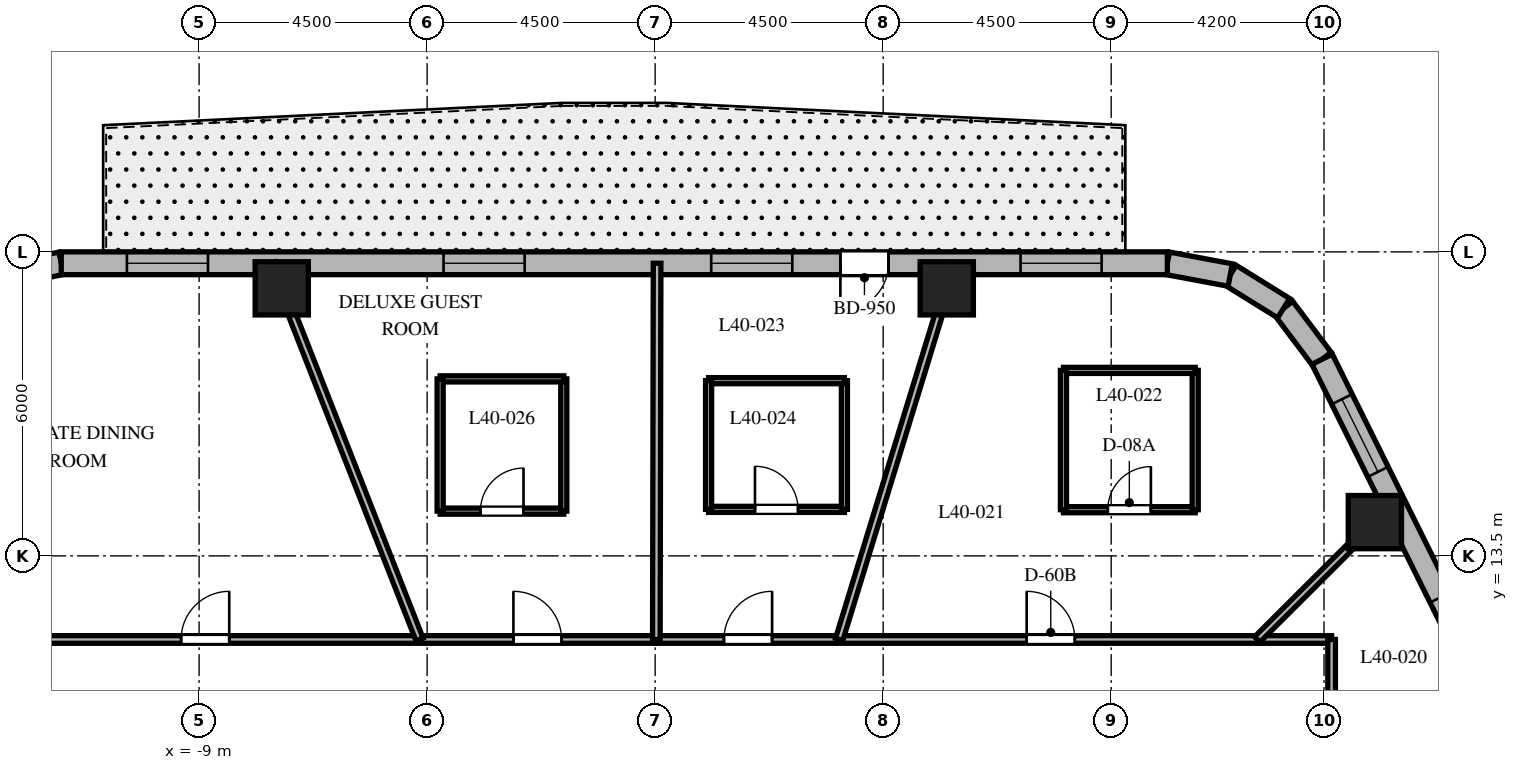
"""IFC4 building model, lengths in metres.
Left out: names, types, materials, properties, quantities, classifications, styles, units other than length and angle.
Written with IfcOpenShell. Run it as: python <this file> out.ifc"""

import sys

from ifc_helpers import new_model, si_unit, direction, frame, frame_2d, origin, origin_2d, place, context, subcontext, project, spatial, rectangle, extrude, element, fill, save


model = new_model("IFC4")
c1 = context("Model", 3, precision=1e-05, world=origin(), true_north=direction((0.0, 1.0)))
c2 = subcontext(c1, "Body", "Model", "MODEL_VIEW")
j1 = project(units=[si_unit("LENGTHUNIT", "METRE"), si_unit("PLANEANGLEUNIT", "RADIAN")], contexts=[c1])
p1 = place(None, origin())
s1 = spatial("IfcSite", under=j1, at=p1, CompositionType="ELEMENT")
p2 = place(p1, origin())
s2 = spatial("IfcBuilding", under=s1, at=p2, CompositionType="ELEMENT")
p3 = place(p2, frame((0.0, 0.0, 162.8)))
s3 = spatial("IfcBuildingStorey", under=s2, at=p3, CompositionType="ELEMENT", Elevation=162.8)
for number, where, z_axis, x_axis in (
    (1, (14.204, 14.166, 0.0), (0.0, 0.0, 1.0), (1.0, 0.0, 0.0)),
    (2, (5.755, 18.78, 0.0), (0.0, 0.0, 1.0), (1.0, 0.0, 0.0)),
    (3, (-7.369, 18.78, 0.0), (0.0, 0.0, 1.0), (1.0, 0.0, 0.0)),
):
    element("IfcColumn", number, at=place(p3, frame(where, z_axis=z_axis, x_axis=x_axis)), inside=s3, PredefinedType="COLUMN", context=c2, shape_type="SweptSolid", body=[
        extrude(rectangle(XDim=1.05, YDim=1.05, at=origin_2d()), origin(), (0.0, 0.0, 1.0), 3.7),
    ])
p4 = place(p3, frame((13.162, 17.381, 0.0), z_axis=(0.0, 0.0, 1.0), x_axis=(-0.601515770517, 0.798860925205, 0.0)))
e4 = element("IfcWall", 4, at=p4, inside=s3, PredefinedType="SOLIDWALL", context=c2, shape_type="SweptSolid", body=[
    extrude(rectangle(XDim=1.262, YDim=0.45, at=frame_2d((0.631, 0.0))), origin(), (0.0, 0.0, 1.0), 3.4),
])
p5 = place(p3, frame((12.403, 18.389, 0.0), z_axis=(0.0, 0.0, 1.0), x_axis=(-0.849795170926, 0.527113049991, 0.0)))
e5 = element("IfcWall", 5, at=p5, inside=s3, PredefinedType="SOLIDWALL", context=c2, shape_type="SweptSolid", body=[
    extrude(rectangle(XDim=1.241, YDim=0.45, at=frame_2d((0.62, 0.0))), origin(), (0.0, 0.0, 1.0), 3.4),
])
p6 = place(p3, frame((11.349, 19.043, 0.0), z_axis=(0.0, 0.0, 1.0), x_axis=(-0.982931267051, 0.183973161772, 0.0)))
e6 = element("IfcWall", 6, at=p6, inside=s3, PredefinedType="SOLIDWALL", context=c2, shape_type="SweptSolid", body=[
    extrude(rectangle(XDim=1.262, YDim=0.45, at=frame_2d((0.631, 0.0))), origin(), (0.0, 0.0, 1.0), 3.4),
])
p7 = place(p3, frame((-11.72, 19.275, 0.0), z_axis=(0.0, 0.0, 1.0), x_axis=(-0.97893106758, -0.204191001093, 0.0)))
e7 = element("IfcWall", 7, at=p7, inside=s3, PredefinedType="SOLIDWALL", context=c2, shape_type="SweptSolid", body=[
    extrude(rectangle(XDim=1.4, YDim=0.45, at=frame_2d((0.7, 0.0))), origin(), (0.0, 0.0, 1.0), 3.4),
])
p8 = place(p3, frame((20.618, 2.344, 0.0), z_axis=(0.0, 0.0, 1.0), x_axis=(-0.444243691097, 0.895905990002, 0.0)))
e8 = element("IfcWall", 8, at=p8, inside=s3, PredefinedType="SOLIDWALL", context=c2, shape_type="SweptSolid", body=[
    extrude(rectangle(XDim=16.784, YDim=0.45, at=frame_2d((8.392, 0.0))), origin(), (0.0, 0.0, 1.0), 3.4),
])
p9 = place(p8, frame((5.245, 0.0, 0.8)))
e9 = element("IfcOpeningElement", 9, at=p9, cuts=e8, PredefinedType="OPENING", context=c2, shape_type="SweptSolid", body=[
    extrude(rectangle(XDim=1.6, YDim=1.75, at=frame_2d((0.8, 0.875))), frame((0.0, 0.235, 0.0), z_axis=(0.0, -1.0, 0.0), x_axis=(1.0, 0.0, 0.0)), (0.0, 0.0, 1.0), 0.47),
])
p10 = place(p8, frame((9.936, 0.0, 0.8)))
e10 = element("IfcOpeningElement", 10, at=p10, cuts=e8, PredefinedType="OPENING", context=c2, shape_type="SweptSolid", body=[
    extrude(rectangle(XDim=1.6, YDim=1.75, at=frame_2d((0.8, 0.875))), frame((0.0, 0.235, 0.0), z_axis=(0.0, -1.0, 0.0), x_axis=(1.0, 0.0, 0.0)), (0.0, 0.0, 1.0), 0.47),
])
p11 = place(p8, frame((14.303, 0.0, 0.8)))
e11 = element("IfcOpeningElement", 11, at=p11, cuts=e8, PredefinedType="OPENING", context=c2, shape_type="SweptSolid", body=[
    extrude(rectangle(XDim=1.6, YDim=1.75, at=frame_2d((0.8, 0.875))), frame((0.0, 0.235, 0.0), z_axis=(0.0, -1.0, 0.0), x_axis=(1.0, 0.0, 0.0)), (0.0, 0.0, 1.0), 0.47),
])
p12 = place(p8, frame((0.931, 0.0, 0.8)))
e12 = element("IfcOpeningElement", 12, at=p12, cuts=e8, PredefinedType="OPENING", context=c2, shape_type="SweptSolid", body=[
    extrude(rectangle(XDim=1.6, YDim=1.75, at=frame_2d((0.8, 0.875))), frame((0.0, 0.235, 0.0), z_axis=(0.0, -1.0, 0.0), x_axis=(1.0, 0.0, 0.0)), (0.0, 0.0, 1.0), 0.47),
])
p13 = place(p3, frame((10.108, 19.275, 0.0), z_axis=(0.0, 0.0, 1.0), x_axis=(-1.0, 0.0, 0.0)))
e13 = element("IfcWall", 13, at=p13, inside=s3, PredefinedType="SOLIDWALL", context=c2, shape_type="SweptSolid", body=[
    extrude(rectangle(XDim=21.829, YDim=0.45, at=frame_2d((10.915, 0.0))), origin(), (0.0, 0.0, 1.0), 3.4),
])
p14 = place(p13, frame((5.503, 0.0, 0.0)))
e14 = element("IfcOpeningElement", 14, at=p14, cuts=e13, PredefinedType="OPENING", context=c2, shape_type="SweptSolid", body=[
    extrude(rectangle(XDim=0.95, YDim=2.15, at=frame_2d((0.475, 1.075))), frame((0.0, 0.235, 0.0), z_axis=(0.0, -1.0, 0.0), x_axis=(1.0, 0.0, 0.0)), (0.0, 0.0, 1.0), 0.47),
])
p15 = place(p13, frame((1.297, 0.0, 0.8)))
e15 = element("IfcOpeningElement", 15, at=p15, cuts=e13, PredefinedType="OPENING", context=c2, shape_type="SweptSolid", body=[
    extrude(rectangle(XDim=1.6, YDim=1.75, at=frame_2d((0.8, 0.875))), frame((0.0, 0.235, 0.0), z_axis=(0.0, -1.0, 0.0), x_axis=(1.0, 0.0, 0.0)), (0.0, 0.0, 1.0), 0.47),
])
p16 = place(p13, frame((7.402, 0.0, 0.8)))
e16 = element("IfcOpeningElement", 16, at=p16, cuts=e13, PredefinedType="OPENING", context=c2, shape_type="SweptSolid", body=[
    extrude(rectangle(XDim=1.6, YDim=1.75, at=frame_2d((0.8, 0.875))), frame((0.0, 0.235, 0.0), z_axis=(0.0, -1.0, 0.0), x_axis=(1.0, 0.0, 0.0)), (0.0, 0.0, 1.0), 0.47),
])
p17 = place(p13, frame((12.684, 0.0, 0.8)))
e17 = element("IfcOpeningElement", 17, at=p17, cuts=e13, PredefinedType="OPENING", context=c2, shape_type="SweptSolid", body=[
    extrude(rectangle(XDim=1.6, YDim=1.75, at=frame_2d((0.8, 0.875))), frame((0.0, 0.235, 0.0), z_axis=(0.0, -1.0, 0.0), x_axis=(1.0, 0.0, 0.0)), (0.0, 0.0, 1.0), 0.47),
])
p18 = place(p13, frame((18.933, 0.0, 0.8)))
e18 = element("IfcOpeningElement", 18, at=p18, cuts=e13, PredefinedType="OPENING", context=c2, shape_type="SweptSolid", body=[
    extrude(rectangle(XDim=1.6, YDim=1.75, at=frame_2d((0.8, 0.875))), frame((0.0, 0.235, 0.0), z_axis=(0.0, -1.0, 0.0), x_axis=(1.0, 0.0, 0.0)), (0.0, 0.0, 1.0), 0.47),
])
p19 = place(p3, frame((-13.35, 11.85, 0.0), z_axis=(0.0, 0.0, 1.0), x_axis=(1.0, 0.0, 0.0)))
e19 = element("IfcWall", 19, at=p19, inside=s3, PredefinedType="PARTITIONING", context=c2, shape_type="SweptSolid", body=[
    extrude(rectangle(XDim=26.7, YDim=0.15, at=frame_2d((13.35, 0.0))), origin(), (0.0, 0.0, 1.0), 2.84),
])
p20 = place(p19, frame((20.682, 0.0, 0.0)))
e20 = element("IfcOpeningElement", 20, at=p20, cuts=e19, PredefinedType="OPENING", context=c2, shape_type="SweptSolid", body=[
    extrude(rectangle(XDim=0.95, YDim=2.03, at=frame_2d((0.475, 1.015))), frame((0.0, 0.085, 0.0), z_axis=(0.0, -1.0, 0.0), x_axis=(1.0, 0.0, 0.0)), (0.0, 0.0, 1.0), 0.17),
])
p21 = place(p19, frame((14.708, 0.0, 0.0)))
e21 = element("IfcOpeningElement", 21, at=p21, cuts=e19, PredefinedType="OPENING", context=c2, shape_type="SweptSolid", body=[
    extrude(rectangle(XDim=0.95, YDim=2.03, at=frame_2d((0.475, 1.015))), frame((0.0, 0.085, 0.0), z_axis=(0.0, -1.0, 0.0), x_axis=(1.0, 0.0, 0.0)), (0.0, 0.0, 1.0), 0.17),
])
p22 = place(p19, frame((10.553, 0.0, 0.0)))
e22 = element("IfcOpeningElement", 22, at=p22, cuts=e19, PredefinedType="OPENING", context=c2, shape_type="SweptSolid", body=[
    extrude(rectangle(XDim=0.95, YDim=2.03, at=frame_2d((0.475, 1.015))), frame((0.0, 0.085, 0.0), z_axis=(0.0, -1.0, 0.0), x_axis=(1.0, 0.0, 0.0)), (0.0, 0.0, 1.0), 0.17),
])
p23 = place(p19, frame((3.995, 0.0, 0.0)))
e23 = element("IfcOpeningElement", 23, at=p23, cuts=e19, PredefinedType="OPENING", context=c2, shape_type="SweptSolid", body=[
    extrude(rectangle(XDim=0.95, YDim=2.03, at=frame_2d((0.475, 1.015))), frame((0.0, 0.085, 0.0), z_axis=(0.0, -1.0, 0.0), x_axis=(1.0, 0.0, 0.0)), (0.0, 0.0, 1.0), 0.17),
])
p24 = place(p3, frame((13.35, 11.85, 0.0), z_axis=(0.0, 0.0, 1.0), x_axis=(0.0, -1.0, 0.0)))
e24 = element("IfcWall", 24, at=p24, inside=s3, PredefinedType="PARTITIONING", context=c2, shape_type="SweptSolid", body=[
    extrude(rectangle(XDim=23.7, YDim=0.15, at=frame_2d((11.85, 0.0))), origin(), (0.0, 0.0, 1.0), 2.84),
])
p25 = place(p24, frame((5.652, 0.0, 0.0)))
e25 = element("IfcOpeningElement", 25, at=p25, cuts=e24, PredefinedType="OPENING", context=c2, shape_type="SweptSolid", body=[
    extrude(rectangle(XDim=0.95, YDim=2.03, at=frame_2d((0.475, 1.015))), frame((0.0, 0.085, 0.0), z_axis=(0.0, -1.0, 0.0), x_axis=(1.0, 0.0, 0.0)), (0.0, 0.0, 1.0), 0.17),
])
p26 = place(p24, frame((1.721, 0.0, 0.0)))
e26 = element("IfcOpeningElement", 26, at=p26, cuts=e24, PredefinedType="OPENING", context=c2, shape_type="SweptSolid", body=[
    extrude(rectangle(XDim=0.9, YDim=2.03, at=frame_2d((0.45, 1.015))), frame((0.0, 0.085, 0.0), z_axis=(0.0, -1.0, 0.0), x_axis=(1.0, 0.0, 0.0)), (0.0, 0.0, 1.0), 0.17),
])
p27 = place(p24, frame((18.389, 0.0, 0.0)))
e27 = element("IfcOpeningElement", 27, at=p27, cuts=e24, PredefinedType="OPENING", context=c2, shape_type="SweptSolid", body=[
    extrude(rectangle(XDim=0.95, YDim=2.03, at=frame_2d((0.475, 1.015))), frame((0.0, 0.085, 0.0), z_axis=(0.0, -1.0, 0.0), x_axis=(1.0, 0.0, 0.0)), (0.0, 0.0, 1.0), 0.17),
])
p28 = place(p24, frame((10.751, 0.0, 0.0)))
e28 = element("IfcOpeningElement", 28, at=p28, cuts=e24, PredefinedType="OPENING", context=c2, shape_type="SweptSolid", body=[
    extrude(rectangle(XDim=0.95, YDim=2.03, at=frame_2d((0.475, 1.015))), frame((0.0, 0.085, 0.0), z_axis=(0.0, -1.0, 0.0), x_axis=(1.0, 0.0, 0.0)), (0.0, 0.0, 1.0), 0.17),
])
p29 = place(p3, frame((11.882, 11.85, 0.0), z_axis=(0.0, 0.0, 1.0), x_axis=(0.708037373639, 0.706174962407, 0.0)))
e29 = element("IfcWall", 29, at=p29, inside=s3, PredefinedType="PARTITIONING", context=c2, shape_type="SweptSolid", body=[
    extrude(rectangle(XDim=3.802, YDim=0.15, at=frame_2d((1.901, 0.0))), origin(), (0.0, 0.0, 1.0), 2.64),
])
p30 = place(p3, frame((3.631, 11.85, 0.0), z_axis=(0.0, 0.0, 1.0), x_axis=(0.293007573338, 0.956110120209, 0.0)))
e30 = element("IfcWall", 30, at=p30, inside=s3, PredefinedType="PARTITIONING", context=c2, shape_type="SweptSolid", body=[
    extrude(rectangle(XDim=7.766, YDim=0.15, at=frame_2d((3.883, 0.0))), origin(), (0.0, 0.0, 1.0), 2.64),
])
p31 = place(p3, frame((0.024, 11.85, 0.0), z_axis=(0.0, 0.0, 1.0), x_axis=(0.001972901592, 0.999998053828, 0.0)))
e31 = element("IfcWall", 31, at=p31, inside=s3, PredefinedType="PARTITIONING", context=c2, shape_type="SweptSolid", body=[
    extrude(rectangle(XDim=7.425, YDim=0.15, at=frame_2d((3.712, 0.0))), origin(), (0.0, 0.0, 1.0), 2.64),
])
p32 = place(p3, frame((-4.65, 11.85, 0.0), z_axis=(0.0, 0.0, 1.0), x_axis=(-0.365265947993, 0.930903210456, 0.0)))
e32 = element("IfcWall", 32, at=p32, inside=s3, PredefinedType="PARTITIONING", context=c2, shape_type="SweptSolid", body=[
    extrude(rectangle(XDim=7.976, YDim=0.15, at=frame_2d((3.988, 0.0))), origin(), (0.0, 0.0, 1.0), 2.64),
])
p33 = place(p3, frame((8.058, 14.411, 0.0), z_axis=(0.0, 0.0, 1.0), x_axis=(1.0, 0.0, 0.0)))
e33 = element("IfcWall", 33, at=p33, inside=s3, PredefinedType="PARTITIONING", context=c2, shape_type="SweptSolid", body=[
    extrude(rectangle(XDim=2.6, YDim=0.12, at=frame_2d((1.3, 0.0))), origin(), (0.0, 0.0, 1.0), 3.4),
])
p34 = place(p33, frame((0.875, 0.0, 0.0)))
e34 = element("IfcOpeningElement", 34, at=p34, cuts=e33, PredefinedType="OPENING", context=c2, shape_type="SweptSolid", body=[
    extrude(rectangle(XDim=0.85, YDim=2.03, at=frame_2d((0.425, 1.015))), frame((0.0, 0.07, 0.0), z_axis=(0.0, -1.0, 0.0), x_axis=(1.0, 0.0, 0.0)), (0.0, 0.0, 1.0), 0.14),
])
p35 = place(p3, frame((10.658, 14.411, 0.0), z_axis=(0.0, 0.0, 1.0), x_axis=(0.0, 1.0, 0.0)))
e35 = element("IfcWall", 35, at=p35, inside=s3, PredefinedType="PARTITIONING", context=c2, shape_type="SweptSolid", body=[
    extrude(rectangle(XDim=2.75, YDim=0.12, at=frame_2d((1.375, 0.0))), origin(), (0.0, 0.0, 1.0), 2.64),
])
p36 = place(p3, frame((10.658, 17.161, 0.0), z_axis=(0.0, 0.0, 1.0), x_axis=(-1.0, 0.0, 0.0)))
e36 = element("IfcWall", 36, at=p36, inside=s3, PredefinedType="PARTITIONING", context=c2, shape_type="SweptSolid", body=[
    extrude(rectangle(XDim=2.6, YDim=0.12, at=frame_2d((1.3, 0.0))), origin(), (0.0, 0.0, 1.0), 2.64),
])
p37 = place(p3, frame((8.058, 17.161, 0.0), z_axis=(0.0, 0.0, 1.0), x_axis=(0.0, -1.0, 0.0)))
e37 = element("IfcWall", 37, at=p37, inside=s3, PredefinedType="PARTITIONING", context=c2, shape_type="SweptSolid", body=[
    extrude(rectangle(XDim=2.75, YDim=0.12, at=frame_2d((1.375, 0.0))), origin(), (0.0, 0.0, 1.0), 3.4),
])
p38 = place(p3, frame((1.055, 14.418, 0.0), z_axis=(0.0, 0.0, 1.0), x_axis=(1.0, 0.0, 0.0)))
e38 = element("IfcWall", 38, at=p38, inside=s3, PredefinedType="PARTITIONING", context=c2, shape_type="SweptSolid", body=[
    extrude(rectangle(XDim=2.68, YDim=0.12, at=frame_2d((1.34, 0.0))), origin(), (0.0, 0.0, 1.0), 3.4),
])
p39 = place(p38, frame((0.915, 0.0, 0.0)))
e39 = element("IfcOpeningElement", 39, at=p39, cuts=e38, PredefinedType="OPENING", context=c2, shape_type="SweptSolid", body=[
    extrude(rectangle(XDim=0.85, YDim=2.03, at=frame_2d((0.425, 1.015))), frame((0.0, 0.07, 0.0), z_axis=(0.0, -1.0, 0.0), x_axis=(1.0, 0.0, 0.0)), (0.0, 0.0, 1.0), 0.14),
])
p40 = place(p3, frame((3.735, 14.418, 0.0), z_axis=(0.0, 0.0, 1.0), x_axis=(0.0, 1.0, 0.0)))
e40 = element("IfcWall", 40, at=p40, inside=s3, PredefinedType="PARTITIONING", context=c2, shape_type="SweptSolid", body=[
    extrude(rectangle(XDim=2.54, YDim=0.12, at=frame_2d((1.27, 0.0))), origin(), (0.0, 0.0, 1.0), 2.84),
])
p41 = place(p3, frame((3.735, 16.958, 0.0), z_axis=(0.0, 0.0, 1.0), x_axis=(-1.0, 0.0, 0.0)))
e41 = element("IfcWall", 41, at=p41, inside=s3, PredefinedType="PARTITIONING", context=c2, shape_type="SweptSolid", body=[
    extrude(rectangle(XDim=2.68, YDim=0.12, at=frame_2d((1.34, 0.0))), origin(), (0.0, 0.0, 1.0), 3.4),
])
p42 = place(p3, frame((1.055, 16.958, 0.0), z_axis=(0.0, 0.0, 1.0), x_axis=(0.0, -1.0, 0.0)))
e42 = element("IfcWall", 42, at=p42, inside=s3, PredefinedType="PARTITIONING", context=c2, shape_type="SweptSolid", body=[
    extrude(rectangle(XDim=2.54, YDim=0.12, at=frame_2d((1.27, 0.0))), origin(), (0.0, 0.0, 1.0), 2.84),
])
p43 = place(p3, frame((-4.243, 14.383, 0.0), z_axis=(0.0, 0.0, 1.0), x_axis=(1.0, 0.0, 0.0)))
e43 = element("IfcWall", 43, at=p43, inside=s3, PredefinedType="PARTITIONING", context=c2, shape_type="SweptSolid", body=[
    extrude(rectangle(XDim=2.44, YDim=0.12, at=frame_2d((1.22, 0.0))), origin(), (0.0, 0.0, 1.0), 3.4),
])
p44 = place(p43, frame((0.795, 0.0, 0.0)))
e44 = element("IfcOpeningElement", 44, at=p44, cuts=e43, PredefinedType="OPENING", context=c2, shape_type="SweptSolid", body=[
    extrude(rectangle(XDim=0.85, YDim=2.03, at=frame_2d((0.425, 1.015))), frame((0.0, 0.07, 0.0), z_axis=(0.0, -1.0, 0.0), x_axis=(1.0, 0.0, 0.0)), (0.0, 0.0, 1.0), 0.14),
])
p45 = place(p3, frame((-1.803, 14.383, 0.0), z_axis=(0.0, 0.0, 1.0), x_axis=(0.0, 1.0, 0.0)))
e45 = element("IfcWall", 45, at=p45, inside=s3, PredefinedType="PARTITIONING", context=c2, shape_type="SweptSolid", body=[
    extrude(rectangle(XDim=2.61, YDim=0.12, at=frame_2d((1.305, 0.0))), origin(), (0.0, 0.0, 1.0), 2.84),
])
p46 = place(p3, frame((-1.803, 16.993, 0.0), z_axis=(0.0, 0.0, 1.0), x_axis=(-1.0, 0.0, 0.0)))
e46 = element("IfcWall", 46, at=p46, inside=s3, PredefinedType="PARTITIONING", context=c2, shape_type="SweptSolid", body=[
    extrude(rectangle(XDim=2.44, YDim=0.12, at=frame_2d((1.22, 0.0))), origin(), (0.0, 0.0, 1.0), 3.4),
])
p47 = place(p3, frame((-4.243, 16.993, 0.0), z_axis=(0.0, 0.0, 1.0), x_axis=(0.0, -1.0, 0.0)))
e47 = element("IfcWall", 47, at=p47, inside=s3, PredefinedType="PARTITIONING", context=c2, shape_type="SweptSolid", body=[
    extrude(rectangle(XDim=2.61, YDim=0.12, at=frame_2d((1.305, 0.0))), origin(), (0.0, 0.0, 1.0), 2.84),
])
p48 = place(p10, origin())
e48 = element("IfcWindow", 48, at=p48, inside=s3, PartitioningType="SINGLE_PANEL", PredefinedType="WINDOW", context=c2, shape_type="SweptSolid", body=[
    extrude(rectangle(XDim=1.6, YDim=1.75, at=frame_2d((0.8, 0.875))), frame((0.0, 0.03, 0.0), z_axis=(0.0, -1.0, 0.0), x_axis=(1.0, 0.0, 0.0)), (0.0, 0.0, 1.0), 0.06),
])
fill(e10, e48)
p49 = place(p11, origin())
e49 = element("IfcWindow", 49, at=p49, inside=s3, PartitioningType="SINGLE_PANEL", PredefinedType="WINDOW", context=c2, shape_type="SweptSolid", body=[
    extrude(rectangle(XDim=1.6, YDim=1.75, at=frame_2d((0.8, 0.875))), frame((0.0, 0.03, 0.0), z_axis=(0.0, -1.0, 0.0), x_axis=(1.0, 0.0, 0.0)), (0.0, 0.0, 1.0), 0.06),
])
fill(e11, e49)
p50 = place(p14, origin())
e50 = element("IfcDoor", 50, at=p50, inside=s3, OperationType="SINGLE_SWING_RIGHT", PredefinedType="DOOR", context=c2, shape_type="SweptSolid", body=[
    extrude(rectangle(XDim=0.95, YDim=2.15, at=frame_2d((0.475, 1.075))), frame((0.0, 0.025, 0.0), z_axis=(0.0, -1.0, 0.0), x_axis=(1.0, 0.0, 0.0)), (0.0, 0.0, 1.0), 0.05),
])
fill(e14, e50)
p51 = place(p15, origin())
e51 = element("IfcWindow", 51, at=p51, inside=s3, PartitioningType="SINGLE_PANEL", PredefinedType="WINDOW", context=c2, shape_type="SweptSolid", body=[
    extrude(rectangle(XDim=1.6, YDim=1.75, at=frame_2d((0.8, 0.875))), frame((0.0, 0.03, 0.0), z_axis=(0.0, -1.0, 0.0), x_axis=(1.0, 0.0, 0.0)), (0.0, 0.0, 1.0), 0.06),
])
fill(e15, e51)
p52 = place(p16, origin())
e52 = element("IfcWindow", 52, at=p52, inside=s3, PartitioningType="SINGLE_PANEL", PredefinedType="WINDOW", context=c2, shape_type="SweptSolid", body=[
    extrude(rectangle(XDim=1.6, YDim=1.75, at=frame_2d((0.8, 0.875))), frame((0.0, 0.03, 0.0), z_axis=(0.0, -1.0, 0.0), x_axis=(1.0, 0.0, 0.0)), (0.0, 0.0, 1.0), 0.06),
])
fill(e16, e52)
p53 = place(p17, origin())
e53 = element("IfcWindow", 53, at=p53, inside=s3, PartitioningType="SINGLE_PANEL", PredefinedType="WINDOW", context=c2, shape_type="SweptSolid", body=[
    extrude(rectangle(XDim=1.6, YDim=1.75, at=frame_2d((0.8, 0.875))), frame((0.0, 0.03, 0.0), z_axis=(0.0, -1.0, 0.0), x_axis=(1.0, 0.0, 0.0)), (0.0, 0.0, 1.0), 0.06),
])
fill(e17, e53)
p54 = place(p18, origin())
e54 = element("IfcWindow", 54, at=p54, inside=s3, PartitioningType="SINGLE_PANEL", PredefinedType="WINDOW", context=c2, shape_type="SweptSolid", body=[
    extrude(rectangle(XDim=1.6, YDim=1.75, at=frame_2d((0.8, 0.875))), frame((0.0, 0.03, 0.0), z_axis=(0.0, -1.0, 0.0), x_axis=(1.0, 0.0, 0.0)), (0.0, 0.0, 1.0), 0.06),
])
fill(e18, e54)
p55 = place(p20, origin())
e55 = element("IfcDoor", 55, at=p55, inside=s3, OperationType="SINGLE_SWING_LEFT", PredefinedType="DOOR", context=c2, shape_type="SweptSolid", body=[
    extrude(rectangle(XDim=0.95, YDim=2.03, at=frame_2d((0.475, 1.015))), frame((0.0, 0.025, 0.0), z_axis=(0.0, -1.0, 0.0), x_axis=(1.0, 0.0, 0.0)), (0.0, 0.0, 1.0), 0.05),
])
fill(e20, e55)
p56 = place(p34, origin())
e56 = element("IfcDoor", 56, at=p56, inside=s3, OperationType="SINGLE_SWING_RIGHT", PredefinedType="DOOR", context=c2, shape_type="SweptSolid", body=[
    extrude(rectangle(XDim=0.85, YDim=2.03, at=frame_2d((0.425, 1.015))), frame((0.0, 0.025, 0.0), z_axis=(0.0, -1.0, 0.0), x_axis=(1.0, 0.0, 0.0)), (0.0, 0.0, 1.0), 0.05),
])
fill(e34, e56)
p57 = place(p21, origin())
e57 = element("IfcDoor", 57, at=p57, inside=s3, OperationType="SINGLE_SWING_RIGHT", PredefinedType="DOOR", context=c2, shape_type="SweptSolid", body=[
    extrude(rectangle(XDim=0.95, YDim=2.03, at=frame_2d((0.475, 1.015))), frame((0.0, 0.025, 0.0), z_axis=(0.0, -1.0, 0.0), x_axis=(1.0, 0.0, 0.0)), (0.0, 0.0, 1.0), 0.05),
])
fill(e21, e57)
p58 = place(p39, origin())
e58 = element("IfcDoor", 58, at=p58, inside=s3, OperationType="SINGLE_SWING_LEFT", PredefinedType="DOOR", context=c2, shape_type="SweptSolid", body=[
    extrude(rectangle(XDim=0.85, YDim=2.03, at=frame_2d((0.425, 1.015))), frame((0.0, 0.025, 0.0), z_axis=(0.0, -1.0, 0.0), x_axis=(1.0, 0.0, 0.0)), (0.0, 0.0, 1.0), 0.05),
])
fill(e39, e58)
p59 = place(p22, origin())
e59 = element("IfcDoor", 59, at=p59, inside=s3, OperationType="SINGLE_SWING_LEFT", PredefinedType="DOOR", context=c2, shape_type="SweptSolid", body=[
    extrude(rectangle(XDim=0.95, YDim=2.03, at=frame_2d((0.475, 1.015))), frame((0.0, 0.025, 0.0), z_axis=(0.0, -1.0, 0.0), x_axis=(1.0, 0.0, 0.0)), (0.0, 0.0, 1.0), 0.05),
])
fill(e22, e59)
p60 = place(p44, origin())
e60 = element("IfcDoor", 60, at=p60, inside=s3, OperationType="SINGLE_SWING_RIGHT", PredefinedType="DOOR", context=c2, shape_type="SweptSolid", body=[
    extrude(rectangle(XDim=0.85, YDim=2.03, at=frame_2d((0.425, 1.015))), frame((0.0, 0.025, 0.0), z_axis=(0.0, -1.0, 0.0), x_axis=(1.0, 0.0, 0.0)), (0.0, 0.0, 1.0), 0.05),
])
fill(e44, e60)
p61 = place(p23, origin())
e61 = element("IfcDoor", 61, at=p61, inside=s3, OperationType="SINGLE_SWING_RIGHT", PredefinedType="DOOR", context=c2, shape_type="SweptSolid", body=[
    extrude(rectangle(XDim=0.95, YDim=2.03, at=frame_2d((0.475, 1.015))), frame((0.0, 0.025, 0.0), z_axis=(0.0, -1.0, 0.0), x_axis=(1.0, 0.0, 0.0)), (0.0, 0.0, 1.0), 0.05),
])
fill(e23, e61)
save(model, sys.argv[1])
